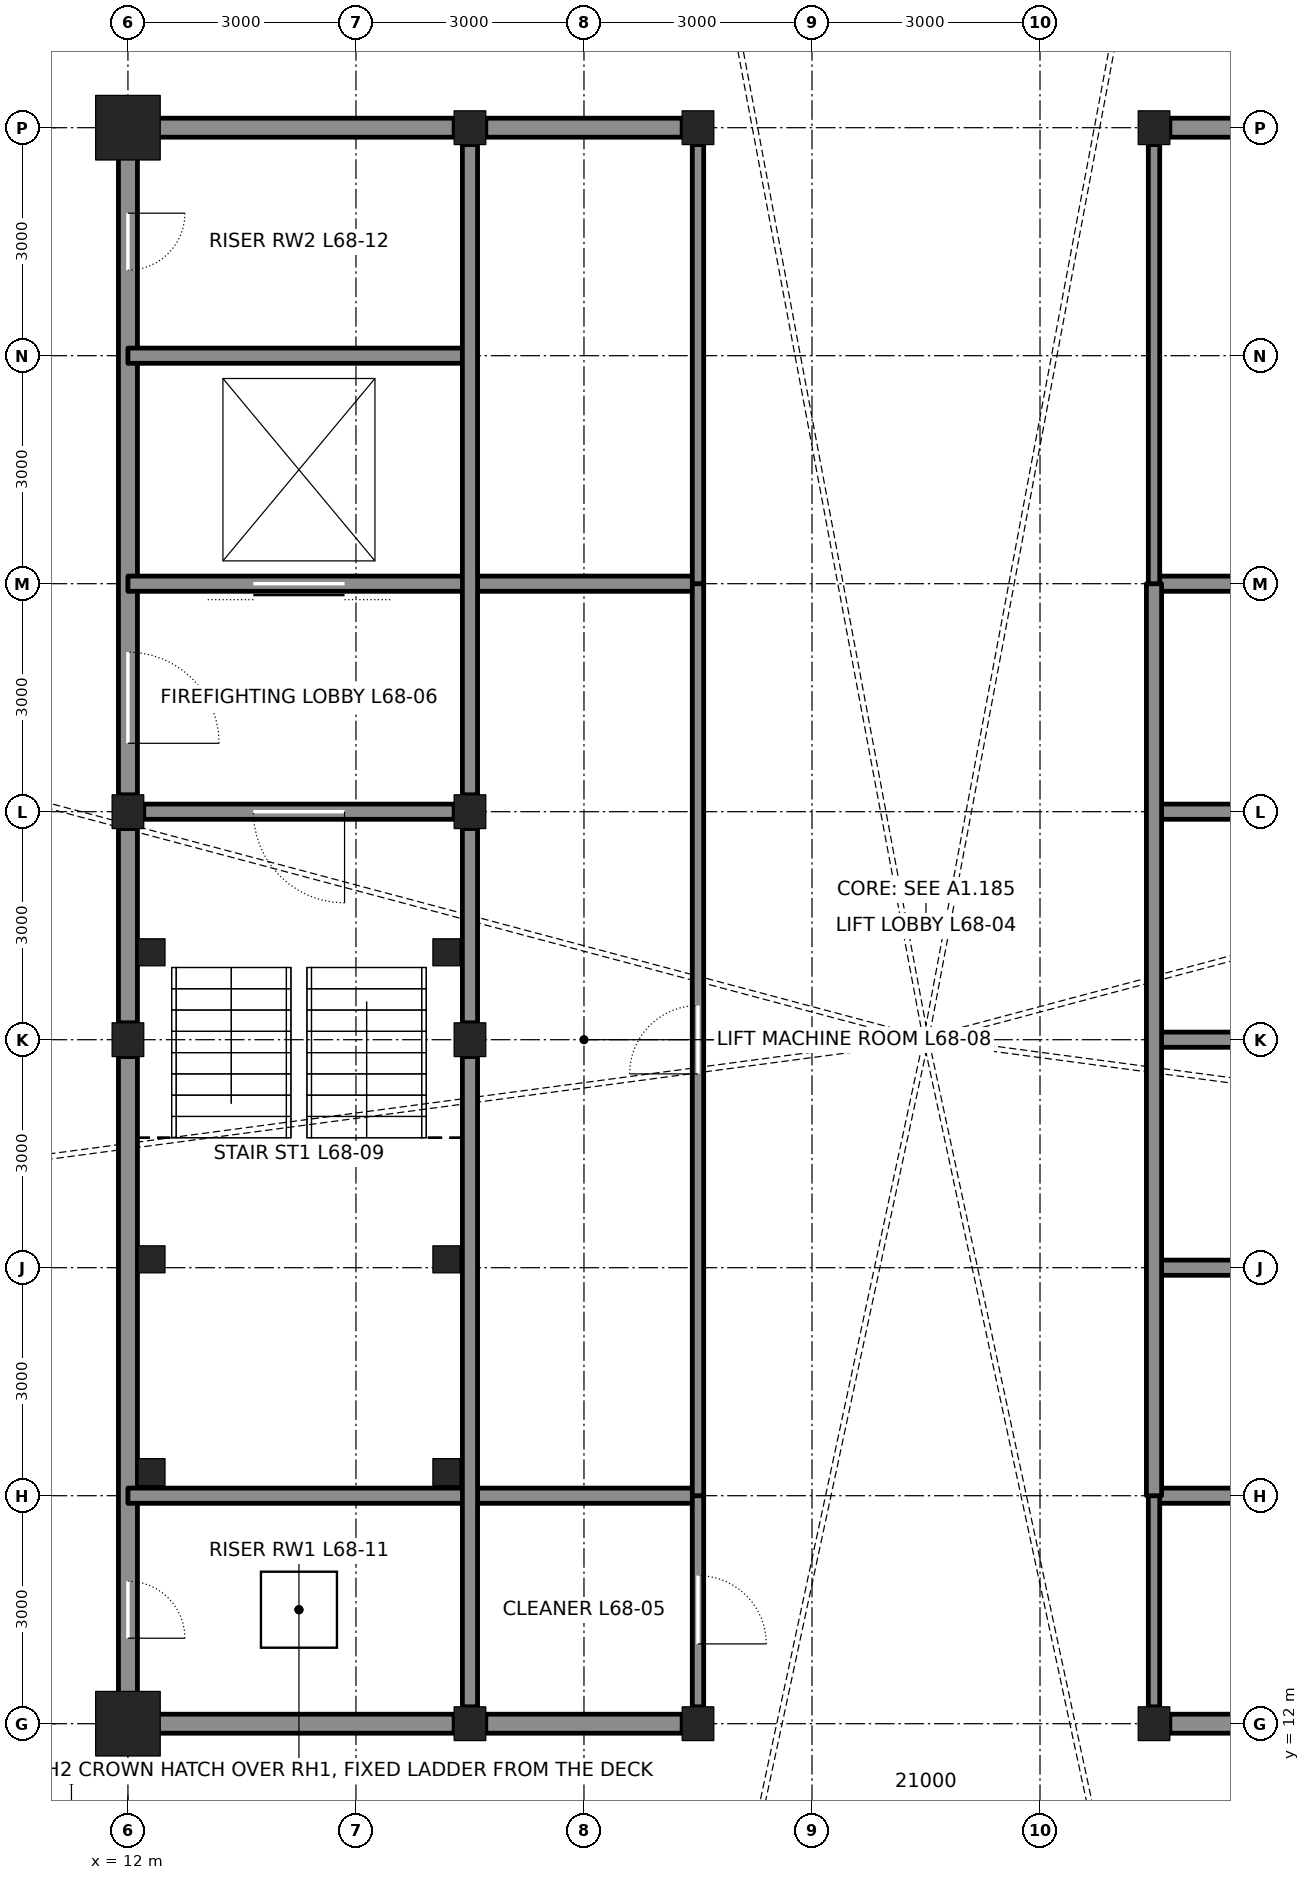
"""IFC4 building model, lengths in metres.
Left out: names, types, materials, properties, quantities, classifications, styles, units other than length and angle.
Written with IfcOpenShell. Run it as: python <this file> out.ifc"""

import sys

from ifc_helpers import new_model, si_unit, direction, frame, frame_2d, origin, origin_2d, place, context, subcontext, project, spatial, rectangle, hollow_rectangle, i_section, extrude, element, fill, save


model = new_model("IFC4")
c1 = context("Model", 3, precision=1e-05, world=origin(), true_north=direction((0.0, 1.0)))
c2 = subcontext(c1, "Body", "Model", "MODEL_VIEW")
j1 = project(units=[si_unit("LENGTHUNIT", "METRE"), si_unit("PLANEANGLEUNIT", "RADIAN")], contexts=[c1])
p1 = place(None, origin())
s1 = spatial("IfcSite", under=j1, at=p1, CompositionType="ELEMENT")
p2 = place(p1, origin())
s2 = spatial("IfcBuilding", under=s1, at=p2, CompositionType="ELEMENT")
p3 = place(p2, frame((0.0, 0.0, 306.0)))
s3 = spatial("IfcBuildingStorey", under=s2, at=p3, CompositionType="ELEMENT", Elevation=306.0)
p4 = place(p3, frame((12.0, 12.0, 0.0), z_axis=(0.0, 0.0, 1.0), x_axis=(1.0, 0.0, 0.0)))
e1 = element("IfcColumn", 1, at=p4, inside=s3, PredefinedType="COLUMN", context=c2, shape_type="SweptSolid", body=[
    extrude(hollow_rectangle(XDim=0.85, YDim=0.85, WallThickness=0.085, at=origin_2d()), origin(), (0.0, 0.0, 1.0), 5.8),
])
for number, where, z_axis, x_axis in (
    (2, (16.5, 12.0, 0.0), (0.0, 0.0, 1.0), (1.0, 0.0, 0.0)),
    (3, (19.5, 12.0, 0.0), (0.0, 0.0, 1.0), (1.0, 0.0, 0.0)),
    (4, (25.5, 12.0, 0.0), (0.0, 0.0, 1.0), (1.0, 0.0, 0.0)),
):
    element("IfcColumn", number, at=place(p3, frame(where, z_axis=z_axis, x_axis=x_axis)), inside=s3, PredefinedType="COLUMN", context=c2, shape_type="SweptSolid", body=[
        extrude(i_section(OverallWidth=0.417, OverallDepth=0.445, WebThickness=0.039, FlangeThickness=0.063, at=origin_2d()), origin(), (0.0, 0.0, 1.0), 6.0),
    ])
p5 = place(p3, frame((12.0, 33.0, 0.0), z_axis=(0.0, 0.0, 1.0), x_axis=(1.0, 0.0, 0.0)))
e5 = element("IfcColumn", 5, at=p5, inside=s3, PredefinedType="COLUMN", context=c2, shape_type="SweptSolid", body=[
    extrude(hollow_rectangle(XDim=0.85, YDim=0.85, WallThickness=0.085, at=origin_2d()), origin(), (0.0, 0.0, 1.0), 5.8),
])
for number, where, z_axis, x_axis in (
    (6, (16.5, 33.0, 0.0), (0.0, 0.0, 1.0), (1.0, 0.0, 0.0)),
    (7, (19.5, 33.0, 0.0), (0.0, 0.0, 1.0), (1.0, 0.0, 0.0)),
    (8, (25.5, 33.0, 0.0), (0.0, 0.0, 1.0), (1.0, 0.0, 0.0)),
    (9, (12.0, 21.0, 0.0), (0.0, 0.0, 1.0), (1.0, 0.0, 0.0)),
    (10, (12.0, 24.0, 0.0), (0.0, 0.0, 1.0), (1.0, 0.0, 0.0)),
    (11, (16.5, 21.0, 0.0), (0.0, 0.0, 1.0), (1.0, 0.0, 0.0)),
    (12, (16.5, 24.0, 0.0), (0.0, 0.0, 1.0), (1.0, 0.0, 0.0)),
):
    element("IfcColumn", number, at=place(p3, frame(where, z_axis=z_axis, x_axis=x_axis)), inside=s3, PredefinedType="COLUMN", context=c2, shape_type="SweptSolid", body=[
        extrude(i_section(OverallWidth=0.417, OverallDepth=0.445, WebThickness=0.039, FlangeThickness=0.063, at=origin_2d()), origin(), (0.0, 0.0, 1.0), 6.0),
    ])
p6 = place(p3, frame((12.0, 12.25, 0.0), z_axis=(0.0, 0.0, 1.0), x_axis=(0.0, 1.0, 0.0)))
e13 = element("IfcWall", 13, at=p6, inside=s3, PredefinedType="SOLIDWALL", context=c2, shape_type="SweptSolid", body=[
    extrude(rectangle(XDim=8.528, YDim=0.25, at=frame_2d((4.264, 0.0))), origin(), (0.0, 0.0, 1.0), 4.873),
])
p7 = place(p6, frame((0.875, 0.0, 0.0)))
e14 = element("IfcOpeningElement", 14, at=p7, cuts=e13, PredefinedType="OPENING", context=c2, shape_type="SweptSolid", body=[
    extrude(rectangle(XDim=0.75, YDim=2.1, at=frame_2d((0.375, 1.05))), frame((0.0, 0.135, 0.0), z_axis=(0.0, -1.0, 0.0), x_axis=(1.0, 0.0, 0.0)), (0.0, 0.0, 1.0), 0.27),
])
p8 = place(p3, frame((12.0, 21.222, 0.0), z_axis=(0.0, 0.0, 1.0), x_axis=(0.0, 1.0, 0.0)))
e15 = element("IfcWall", 15, at=p8, inside=s3, PredefinedType="SOLIDWALL", context=c2, shape_type="SweptSolid", body=[
    extrude(rectangle(XDim=2.555, YDim=0.25, at=frame_2d((1.278, 0.0))), origin(), (0.0, 0.0, 1.0), 4.873),
])
p9 = place(p3, frame((12.0, 24.222, 0.0), z_axis=(0.0, 0.0, 1.0), x_axis=(0.0, 1.0, 0.0)))
e16 = element("IfcWall", 16, at=p9, inside=s3, PredefinedType="SOLIDWALL", context=c2, shape_type="SweptSolid", body=[
    extrude(rectangle(XDim=8.528, YDim=0.25, at=frame_2d((4.264, 0.0))), origin(), (0.0, 0.0, 1.0), 4.873),
])
p10 = place(p9, frame((0.678, 0.0, 0.0)))
e17 = element("IfcOpeningElement", 17, at=p10, cuts=e16, PredefinedType="OPENING", context=c2, shape_type="SweptSolid", body=[
    extrude(rectangle(XDim=1.2, YDim=2.1, at=frame_2d((0.6, 1.05))), frame((0.0, 0.135, 0.0), z_axis=(0.0, -1.0, 0.0), x_axis=(1.0, 0.0, 0.0)), (0.0, 0.0, 1.0), 0.27),
])
p11 = place(p9, frame((6.903, 0.0, 0.0)))
e18 = element("IfcOpeningElement", 18, at=p11, cuts=e16, PredefinedType="OPENING", context=c2, shape_type="SweptSolid", body=[
    extrude(rectangle(XDim=0.75, YDim=2.1, at=frame_2d((0.375, 1.05))), frame((0.0, 0.135, 0.0), z_axis=(0.0, -1.0, 0.0), x_axis=(1.0, 0.0, 0.0)), (0.0, 0.0, 1.0), 0.27),
])
p12 = place(p3, frame((12.25, 12.0, 0.0), z_axis=(0.0, 0.0, 1.0), x_axis=(1.0, 0.0, 0.0)))
e19 = element("IfcWall", 19, at=p12, inside=s3, PredefinedType="SOLIDWALL", context=c2, shape_type="SweptSolid", body=[
    extrude(rectangle(XDim=4.042, YDim=0.25, at=frame_2d((2.021, 0.0))), origin(), (0.0, 0.0, 1.0), 4.941),
])
for number, where, z_axis, x_axis in (
    (20, (16.708, 12.0, 0.0), (0.0, 0.0, 1.0), (1.0, 0.0, 0.0)),
    (21, (25.708, 12.0, 0.0), (0.0, 0.0, 1.0), (1.0, 0.0, 0.0)),
):
    element("IfcWall", number, at=place(p3, frame(where, z_axis=z_axis, x_axis=x_axis)), inside=s3, PredefinedType="SOLIDWALL", context=c2, shape_type="SweptSolid", body=[
        extrude(rectangle(XDim=2.583, YDim=0.25, at=frame_2d((1.292, 0.0))), origin(), (0.0, 0.0, 1.0), 4.941),
    ])
for number, where, z_axis, x_axis in (
    (22, (12.0, 15.0, 0.0), (0.0, 0.0, 1.0), (1.0, 0.0, 0.0)),
    (23, (25.5, 15.0, 0.0), (0.0, 0.0, 1.0), (1.0, 0.0, 0.0)),
):
    element("IfcWall", number, at=place(p3, frame(where, z_axis=z_axis, x_axis=x_axis)), inside=s3, PredefinedType="SOLIDWALL", context=c2, shape_type="SweptSolid", body=[
        extrude(rectangle(XDim=7.5, YDim=0.2, at=frame_2d((3.75, 0.0))), origin(), (0.0, 0.0, 1.0), 5.8),
    ])
p13 = place(p3, frame((12.208, 24.0, 0.0), z_axis=(0.0, 0.0, 1.0), x_axis=(1.0, 0.0, 0.0)))
e24 = element("IfcWall", 24, at=p13, inside=s3, PredefinedType="SOLIDWALL", context=c2, shape_type="SweptSolid", body=[
    extrude(rectangle(XDim=4.083, YDim=0.2, at=frame_2d((2.042, 0.0))), origin(), (0.0, 0.0, 1.0), 4.85),
])
p14 = place(p13, frame((1.442, 0.0, 0.0)))
e25 = element("IfcOpeningElement", 25, at=p14, cuts=e24, PredefinedType="OPENING", context=c2, shape_type="SweptSolid", body=[
    extrude(rectangle(XDim=1.2, YDim=2.1, at=frame_2d((0.6, 1.05))), frame((0.0, 0.11, 0.0), z_axis=(0.0, -1.0, 0.0), x_axis=(1.0, 0.0, 0.0)), (0.0, 0.0, 1.0), 0.22),
])
p15 = place(p3, frame((25.5, 24.0, 0.0), z_axis=(0.0, 0.0, 1.0), x_axis=(1.0, 0.0, 0.0)))
e26 = element("IfcWall", 26, at=p15, inside=s3, PredefinedType="SOLIDWALL", context=c2, shape_type="SweptSolid", body=[
    extrude(rectangle(XDim=2.792, YDim=0.2, at=frame_2d((1.396, 0.0))), origin(), (0.0, 0.0, 1.0), 4.85),
])
p16 = place(p3, frame((12.0, 27.0, 0.0), z_axis=(0.0, 0.0, 1.0), x_axis=(1.0, 0.0, 0.0)))
e27 = element("IfcWall", 27, at=p16, inside=s3, PredefinedType="SOLIDWALL", context=c2, shape_type="SweptSolid", body=[
    extrude(rectangle(XDim=7.5, YDim=0.2, at=frame_2d((3.75, 0.0))), origin(), (0.0, 0.0, 1.0), 5.8),
])
p17 = place(p16, frame((1.65, 0.0, 0.0)))
e28 = element("IfcOpeningElement", 28, at=p17, cuts=e27, PredefinedType="OPENING", context=c2, shape_type="SweptSolid", body=[
    extrude(rectangle(XDim=1.2, YDim=2.1, at=frame_2d((0.6, 1.05))), frame((0.0, 0.11, 0.0), z_axis=(0.0, -1.0, 0.0), x_axis=(1.0, 0.0, 0.0)), (0.0, 0.0, 1.0), 0.22),
])
p18 = place(p3, frame((25.5, 27.0, 0.0), z_axis=(0.0, 0.0, 1.0), x_axis=(1.0, 0.0, 0.0)))
e29 = element("IfcWall", 29, at=p18, inside=s3, PredefinedType="SOLIDWALL", context=c2, shape_type="SweptSolid", body=[
    extrude(rectangle(XDim=3.0, YDim=0.2, at=frame_2d((1.5, 0.0))), origin(), (0.0, 0.0, 1.0), 5.8),
])
p19 = place(p3, frame((12.0, 30.0, 0.0), z_axis=(0.0, 0.0, 1.0), x_axis=(1.0, 0.0, 0.0)))
e30 = element("IfcWall", 30, at=p19, inside=s3, PredefinedType="SOLIDWALL", context=c2, shape_type="SweptSolid", body=[
    extrude(rectangle(XDim=4.5, YDim=0.2, at=frame_2d((2.25, 0.0))), origin(), (0.0, 0.0, 1.0), 5.8),
])
p20 = place(p3, frame((12.25, 33.0, 0.0), z_axis=(0.0, 0.0, 1.0), x_axis=(1.0, 0.0, 0.0)))
e31 = element("IfcWall", 31, at=p20, inside=s3, PredefinedType="SOLIDWALL", context=c2, shape_type="SweptSolid", body=[
    extrude(rectangle(XDim=4.042, YDim=0.25, at=frame_2d((2.021, 0.0))), origin(), (0.0, 0.0, 1.0), 4.941),
])
for number, where, z_axis, x_axis in (
    (32, (16.708, 33.0, 0.0), (0.0, 0.0, 1.0), (1.0, 0.0, 0.0)),
    (33, (25.708, 33.0, 0.0), (0.0, 0.0, 1.0), (1.0, 0.0, 0.0)),
):
    element("IfcWall", number, at=place(p3, frame(where, z_axis=z_axis, x_axis=x_axis)), inside=s3, PredefinedType="SOLIDWALL", context=c2, shape_type="SweptSolid", body=[
        extrude(rectangle(XDim=2.583, YDim=0.25, at=frame_2d((1.292, 0.0))), origin(), (0.0, 0.0, 1.0), 4.941),
    ])
p21 = place(p3, frame((16.5, 12.222, 0.0), z_axis=(0.0, 0.0, 1.0), x_axis=(0.0, 1.0, 0.0)))
e34 = element("IfcWall", 34, at=p21, inside=s3, PredefinedType="SOLIDWALL", context=c2, shape_type="SweptSolid", body=[
    extrude(rectangle(XDim=8.555, YDim=0.2, at=frame_2d((4.278, 0.0))), origin(), (0.0, 0.0, 1.0), 4.873),
])
p22 = place(p3, frame((16.5, 21.222, 0.0), z_axis=(0.0, 0.0, 1.0), x_axis=(0.0, 1.0, 0.0)))
e35 = element("IfcWall", 35, at=p22, inside=s3, PredefinedType="SOLIDWALL", context=c2, shape_type="SweptSolid", body=[
    extrude(rectangle(XDim=2.555, YDim=0.2, at=frame_2d((1.278, 0.0))), origin(), (0.0, 0.0, 1.0), 4.873),
])
p23 = place(p3, frame((16.5, 24.222, 0.0), z_axis=(0.0, 0.0, 1.0), x_axis=(0.0, 1.0, 0.0)))
e36 = element("IfcWall", 36, at=p23, inside=s3, PredefinedType="SOLIDWALL", context=c2, shape_type="SweptSolid", body=[
    extrude(rectangle(XDim=8.555, YDim=0.2, at=frame_2d((4.278, 0.0))), origin(), (0.0, 0.0, 1.0), 4.873),
])
p24 = place(p3, frame((25.5, 18.0, 0.0), z_axis=(0.0, 0.0, 1.0), x_axis=(1.0, 0.0, 0.0)))
e37 = element("IfcWall", 37, at=p24, inside=s3, PredefinedType="SOLIDWALL", context=c2, shape_type="SweptSolid", body=[
    extrude(rectangle(XDim=7.5, YDim=0.2, at=frame_2d((3.75, 0.0))), origin(), (0.0, 0.0, 1.0), 5.8),
])
p25 = place(p24, frame((4.65, 0.0, 0.0)))
e38 = element("IfcOpeningElement", 38, at=p25, cuts=e37, PredefinedType="OPENING", context=c2, shape_type="SweptSolid", body=[
    extrude(rectangle(XDim=1.2, YDim=2.1, at=frame_2d((0.6, 1.05))), frame((0.0, 0.11, 0.0), z_axis=(0.0, -1.0, 0.0), x_axis=(1.0, 0.0, 0.0)), (0.0, 0.0, 1.0), 0.22),
])
p26 = place(p3, frame((25.5, 21.0, 0.0), z_axis=(0.0, 0.0, 1.0), x_axis=(1.0, 0.0, 0.0)))
e39 = element("IfcWall", 39, at=p26, inside=s3, PredefinedType="SOLIDWALL", context=c2, shape_type="SweptSolid", body=[
    extrude(rectangle(XDim=2.792, YDim=0.2, at=frame_2d((1.396, 0.0))), origin(), (0.0, 0.0, 1.0), 4.85),
])
p27 = place(p3, frame((19.5, 12.222, 0.0), z_axis=(0.0, 0.0, 1.0), x_axis=(0.0, 1.0, 0.0)))
e40 = element("IfcWall", 40, at=p27, inside=s3, PredefinedType="PARTITIONING", context=c2, shape_type="SweptSolid", body=[
    extrude(rectangle(XDim=2.778, YDim=0.15, at=frame_2d((1.389, 0.0))), origin(), (0.0, 0.0, 1.0), 4.825),
])
p28 = place(p27, frame((0.828, 0.0, 0.0)))
e41 = element("IfcOpeningElement", 41, at=p28, cuts=e40, PredefinedType="OPENING", context=c2, shape_type="SweptSolid", body=[
    extrude(rectangle(XDim=0.9, YDim=2.1, at=frame_2d((0.45, 1.05))), frame((0.0, 0.085, 0.0), z_axis=(0.0, -1.0, 0.0), x_axis=(1.0, 0.0, 0.0)), (0.0, 0.0, 1.0), 0.17),
])
p29 = place(p3, frame((19.5, 15.0, 0.0), z_axis=(0.0, 0.0, 1.0), x_axis=(0.0, 1.0, 0.0)))
e42 = element("IfcWall", 42, at=p29, inside=s3, PredefinedType="PARTITIONING", context=c2, shape_type="SweptSolid", body=[
    extrude(rectangle(XDim=12.0, YDim=0.15, at=frame_2d((6.0, 0.0))), origin(), (0.0, 0.0, 1.0), 4.825),
])
p30 = place(p29, frame((5.55, 0.0, 0.0)))
e43 = element("IfcOpeningElement", 43, at=p30, cuts=e42, PredefinedType="OPENING", context=c2, shape_type="SweptSolid", body=[
    extrude(rectangle(XDim=0.9, YDim=2.1, at=frame_2d((0.45, 1.05))), frame((0.0, 0.085, 0.0), z_axis=(0.0, -1.0, 0.0), x_axis=(1.0, 0.0, 0.0)), (0.0, 0.0, 1.0), 0.17),
])
p31 = place(p3, frame((19.5, 27.0, 0.0), z_axis=(0.0, 0.0, 1.0), x_axis=(0.0, 1.0, 0.0)))
e44 = element("IfcWall", 44, at=p31, inside=s3, PredefinedType="PARTITIONING", context=c2, shape_type="SweptSolid", body=[
    extrude(rectangle(XDim=5.778, YDim=0.15, at=frame_2d((2.889, 0.0))), origin(), (0.0, 0.0, 1.0), 4.825),
])
p32 = place(p3, frame((25.5, 12.222, 0.0), z_axis=(0.0, 0.0, 1.0), x_axis=(0.0, 1.0, 0.0)))
e45 = element("IfcWall", 45, at=p32, inside=s3, PredefinedType="PARTITIONING", context=c2, shape_type="SweptSolid", body=[
    extrude(rectangle(XDim=2.778, YDim=0.15, at=frame_2d((1.389, 0.0))), origin(), (0.0, 0.0, 1.0), 4.825),
])
p33 = place(p3, frame((25.5, 15.0, 0.0), z_axis=(0.0, 0.0, 1.0), x_axis=(0.0, 1.0, 0.0)))
e46 = element("IfcWall", 46, at=p33, inside=s3, PredefinedType="SOLIDWALL", context=c2, shape_type="SweptSolid", body=[
    extrude(rectangle(XDim=12.0, YDim=0.2, at=frame_2d((6.0, 0.0))), origin(), (0.0, 0.0, 1.0), 4.825),
])
p34 = place(p3, frame((25.5, 27.0, 0.0), z_axis=(0.0, 0.0, 1.0), x_axis=(0.0, 1.0, 0.0)))
e47 = element("IfcWall", 47, at=p34, inside=s3, PredefinedType="PARTITIONING", context=c2, shape_type="SweptSolid", body=[
    extrude(rectangle(XDim=5.778, YDim=0.15, at=frame_2d((2.889, 0.0))), origin(), (0.0, 0.0, 1.0), 4.825),
])
for number, where, z_axis, x_axis in (
    (48, (12.31, 15.31, 0.0), (0.0, 0.0, 1.0), (1.0, 0.0, 0.0)),
    (49, (16.19, 15.31, 0.0), (0.0, 0.0, 1.0), (1.0, 0.0, 0.0)),
    (50, (12.31, 18.11, 0.0), (0.0, 0.0, 1.0), (1.0, 0.0, 0.0)),
    (51, (16.19, 18.11, 0.0), (0.0, 0.0, 1.0), (1.0, 0.0, 0.0)),
    (52, (12.31, 22.15, 0.0), (0.0, 0.0, 1.0), (1.0, 0.0, 0.0)),
    (53, (16.19, 22.15, 0.0), (0.0, 0.0, 1.0), (1.0, 0.0, 0.0)),
):
    element("IfcColumn", number, at=place(p3, frame(where, z_axis=z_axis, x_axis=x_axis)), inside=s3, PredefinedType="COLUMN", context=c2, shape_type="SweptSolid", body=[
        extrude(hollow_rectangle(XDim=0.356, YDim=0.356, WallThickness=0.009, at=origin_2d()), origin(), (0.0, 0.0, 1.0), 5.8),
    ])
p35 = place(p3, frame((14.25, 13.5, 12.582)))
p36 = place(p35, frame((0.0, 0.0, 0.335)))
e54 = element("IfcDoor", 54, at=p36, inside=s3, OperationType="SINGLE_SWING_LEFT", PredefinedType="TRAPDOOR", context=c2, shape_type="SweptSolid", body=[
    extrude(rectangle(XDim=1.0, YDim=1.0, at=origin_2d()), origin(), (0.0, 0.0, 1.0), 0.05),
])
p37 = place(p14, frame((1.2, 0.0, 0.0), z_axis=(0.0, 0.0, 1.0), x_axis=(-1.0, 0.0, 0.0)))
e55 = element("IfcDoor", 55, at=p37, inside=s3, OperationType="SINGLE_SWING_LEFT", PredefinedType="DOOR", context=c2, shape_type="SweptSolid", body=[
    extrude(rectangle(XDim=1.2, YDim=2.1, at=frame_2d((0.6, 1.05))), frame((0.0, 0.025, 0.0), z_axis=(0.0, -1.0, 0.0), x_axis=(1.0, 0.0, 0.0)), (0.0, 0.0, 1.0), 0.05),
])
fill(e25, e55)
p38 = place(p10, frame((1.2, 0.0, 0.0), z_axis=(0.0, 0.0, 1.0), x_axis=(-1.0, 0.0, 0.0)))
e56 = element("IfcDoor", 56, at=p38, inside=s3, OperationType="SINGLE_SWING_RIGHT", PredefinedType="DOOR", context=c2, shape_type="SweptSolid", body=[
    extrude(rectangle(XDim=1.2, YDim=2.1, at=frame_2d((0.6, 1.05))), frame((0.0, 0.025, 0.0), z_axis=(0.0, -1.0, 0.0), x_axis=(1.0, 0.0, 0.0)), (0.0, 0.0, 1.0), 0.05),
])
fill(e17, e56)
p39 = place(p17, origin())
e57 = element("IfcDoor", 57, at=p39, inside=s3, OperationType="DOUBLE_DOOR_SLIDING", PredefinedType="DOOR", context=c2, shape_type="SweptSolid", body=[
    extrude(rectangle(XDim=1.2, YDim=2.1, at=frame_2d((0.6, 1.05))), frame((0.0, 0.025, 0.0), z_axis=(0.0, -1.0, 0.0), x_axis=(1.0, 0.0, 0.0)), (0.0, 0.0, 1.0), 0.05),
])
fill(e28, e57)
p40 = place(p7, frame((0.75, 0.0, 0.0), z_axis=(0.0, 0.0, 1.0), x_axis=(-1.0, 0.0, 0.0)))
e58 = element("IfcDoor", 58, at=p40, inside=s3, OperationType="SINGLE_SWING_RIGHT", PredefinedType="DOOR", context=c2, shape_type="SweptSolid", body=[
    extrude(rectangle(XDim=0.75, YDim=2.1, at=frame_2d((0.375, 1.05))), frame((0.0, 0.025, 0.0), z_axis=(0.0, -1.0, 0.0), x_axis=(1.0, 0.0, 0.0)), (0.0, 0.0, 1.0), 0.05),
])
fill(e14, e58)
p41 = place(p11, frame((0.75, 0.0, 0.0), z_axis=(0.0, 0.0, 1.0), x_axis=(-1.0, 0.0, 0.0)))
e59 = element("IfcDoor", 59, at=p41, inside=s3, OperationType="SINGLE_SWING_LEFT", PredefinedType="DOOR", context=c2, shape_type="SweptSolid", body=[
    extrude(rectangle(XDim=0.75, YDim=2.1, at=frame_2d((0.375, 1.05))), frame((0.0, 0.025, 0.0), z_axis=(0.0, -1.0, 0.0), x_axis=(1.0, 0.0, 0.0)), (0.0, 0.0, 1.0), 0.05),
])
fill(e18, e59)
p42 = place(p30, origin())
e60 = element("IfcDoor", 60, at=p42, inside=s3, OperationType="SINGLE_SWING_LEFT", PredefinedType="DOOR", context=c2, shape_type="SweptSolid", body=[
    extrude(rectangle(XDim=0.9, YDim=2.1, at=frame_2d((0.45, 1.05))), frame((0.0, 0.025, 0.0), z_axis=(0.0, -1.0, 0.0), x_axis=(1.0, 0.0, 0.0)), (0.0, 0.0, 1.0), 0.05),
])
fill(e43, e60)
p43 = place(p28, frame((0.9, 0.0, 0.0), z_axis=(0.0, 0.0, 1.0), x_axis=(-1.0, 0.0, 0.0)))
e61 = element("IfcDoor", 61, at=p43, inside=s3, OperationType="SINGLE_SWING_RIGHT", PredefinedType="DOOR", context=c2, shape_type="SweptSolid", body=[
    extrude(rectangle(XDim=0.9, YDim=2.1, at=frame_2d((0.45, 1.05))), frame((0.0, 0.025, 0.0), z_axis=(0.0, -1.0, 0.0), x_axis=(1.0, 0.0, 0.0)), (0.0, 0.0, 1.0), 0.05),
])
fill(e41, e61)
save(model, sys.argv[1])
